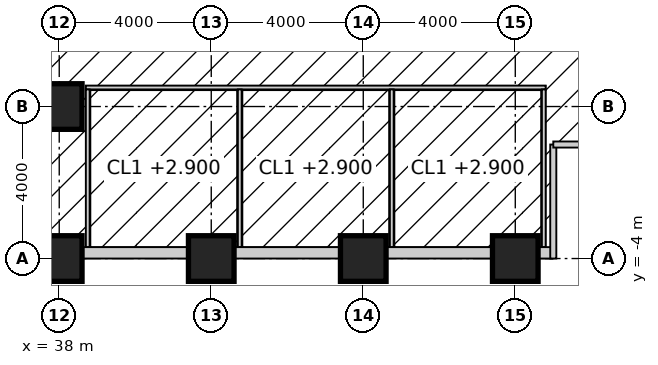
"""IFC4 building model, lengths in metres.
Left out: names, types, materials, properties, quantities, classifications, styles, units other than length and angle.
Written with IfcOpenShell. Run it as: python <this file> out.ifc"""

import sys

from ifc_helpers import new_model, si_unit, direction, frame, frame_2d, origin, origin_2d, place, context, subcontext, project, spatial, rectangle, hollow_rectangle, extrude, element, fill, save


model = new_model("IFC4")
c1 = context("Model", 3, precision=1e-05, world=origin(), true_north=direction((0.0, 1.0)))
c2 = subcontext(c1, "Body", "Model", "MODEL_VIEW")
j1 = project(units=[si_unit("LENGTHUNIT", "METRE"), si_unit("PLANEANGLEUNIT", "RADIAN")], contexts=[c1])
p1 = place(None, origin())
s1 = spatial("IfcSite", under=j1, at=p1, CompositionType="ELEMENT")
p2 = place(p1, origin())
s2 = spatial("IfcBuilding", under=s1, at=p2, CompositionType="ELEMENT")
p3 = place(p2, frame((0.0, 0.0, 27.0)))
s3 = spatial("IfcBuildingStorey", under=s2, at=p3, CompositionType="ELEMENT", Elevation=27.0)
for number, where, z_axis, x_axis in (
    (1, (38.0, -4.0, 0.0), (0.0, 0.0, 1.0), (1.0, 0.0, 0.0)),
    (2, (42.0, -4.0, 0.0), (0.0, 0.0, 1.0), (1.0, 0.0, 0.0)),
    (3, (46.0, -4.0, 0.0), (0.0, 0.0, 1.0), (1.0, 0.0, 0.0)),
    (4, (50.0, -4.0, 0.0), (0.0, 0.0, 1.0), (1.0, 0.0, 0.0)),
    (5, (38.0, 0.0, 0.0), (0.0, 0.0, 1.0), (1.0, 0.0, 0.0)),
):
    element("IfcColumn", number, at=place(p3, frame(where, z_axis=z_axis, x_axis=x_axis)), inside=s3, PredefinedType="COLUMN", context=c2, shape_type="SweptSolid", body=[
        extrude(hollow_rectangle(XDim=1.2, YDim=1.2, WallThickness=0.1, at=origin_2d()), origin(), (0.0, 0.0, 1.0), 4.0),
    ])
p4 = place(p3, frame((38.7, 0.5, 0.0), z_axis=(0.0, 0.0, 1.0), x_axis=(1.0, 0.0, 0.0)))
e6 = element("IfcWall", 6, at=p4, inside=s3, PredefinedType="PARTITIONING", context=c2, shape_type="SweptSolid", body=[
    extrude(rectangle(XDim=12.1, YDim=0.1, at=frame_2d((6.05, 0.0))), origin(), (0.0, 0.0, 1.0), 3.85),
])
p5 = place(p4, frame((1.55, 0.0, 0.0)))
e7 = element("IfcOpeningElement", 7, at=p5, cuts=e6, PredefinedType="OPENING", context=c2, shape_type="SweptSolid", body=[
    extrude(rectangle(XDim=1.0, YDim=2.2, at=frame_2d((0.5, 1.1))), frame((0.0, 0.06, 0.0), z_axis=(0.0, -1.0, 0.0), x_axis=(1.0, 0.0, 0.0)), (0.0, 0.0, 1.0), 0.12),
])
p6 = place(p4, frame((5.55, 0.0, 0.0)))
e8 = element("IfcOpeningElement", 8, at=p6, cuts=e6, PredefinedType="OPENING", context=c2, shape_type="SweptSolid", body=[
    extrude(rectangle(XDim=1.0, YDim=2.2, at=frame_2d((0.5, 1.1))), frame((0.0, 0.06, 0.0), z_axis=(0.0, -1.0, 0.0), x_axis=(1.0, 0.0, 0.0)), (0.0, 0.0, 1.0), 0.12),
])
p7 = place(p4, frame((9.55, 0.0, 0.0)))
e9 = element("IfcOpeningElement", 9, at=p7, cuts=e6, PredefinedType="OPENING", context=c2, shape_type="SweptSolid", body=[
    extrude(rectangle(XDim=1.0, YDim=2.2, at=frame_2d((0.5, 1.1))), frame((0.0, 0.06, 0.0), z_axis=(0.0, -1.0, 0.0), x_axis=(1.0, 0.0, 0.0)), (0.0, 0.0, 1.0), 0.12),
])
for number, where, z_axis, x_axis in (
    (10, (38.75, -3.7, 0.0), (0.0, 0.0, 1.0), (0.0, 1.0, 0.0)),
    (11, (42.75, -3.7, 0.0), (0.0, 0.0, 1.0), (0.0, 1.0, 0.0)),
    (12, (46.75, -3.7, 0.0), (0.0, 0.0, 1.0), (0.0, 1.0, 0.0)),
    (13, (50.75, -3.7, 0.0), (0.0, 0.0, 1.0), (0.0, 1.0, 0.0)),
):
    element("IfcWall", number, at=place(p3, frame(where, z_axis=z_axis, x_axis=x_axis)), inside=s3, PredefinedType="PARTITIONING", context=c2, shape_type="SweptSolid", body=[
        extrude(rectangle(XDim=4.15, YDim=0.1, at=frame_2d((2.075, 0.0))), origin(), (0.0, 0.0, 1.0), 3.85),
    ])
p8 = place(p3, frame((38.6, -3.85, 0.0), z_axis=(0.0, 0.0, 1.0), x_axis=(1.0, 0.0, 0.0)))
e14 = element("IfcWall", 14, at=p8, inside=s3, PredefinedType="ELEMENTEDWALL", context=c2, shape_type="SweptSolid", body=[
    extrude(rectangle(XDim=2.8, YDim=0.3, at=frame_2d((1.4, 0.0))), origin(), (0.0, 0.0, 1.0), 2.85),
])
p9 = place(p8, frame((0.4, 0.0, 0.8)))
e15 = element("IfcOpeningElement", 15, at=p9, cuts=e14, PredefinedType="OPENING", context=c2, shape_type="SweptSolid", body=[
    extrude(rectangle(XDim=2.0, YDim=2.0, at=frame_2d((1.0, 1.0))), frame((0.0, 0.16, 0.0), z_axis=(0.0, -1.0, 0.0), x_axis=(1.0, 0.0, 0.0)), (0.0, 0.0, 1.0), 0.32),
])
p10 = place(p3, frame((42.6, -3.85, 0.0), z_axis=(0.0, 0.0, 1.0), x_axis=(1.0, 0.0, 0.0)))
e16 = element("IfcWall", 16, at=p10, inside=s3, PredefinedType="ELEMENTEDWALL", context=c2, shape_type="SweptSolid", body=[
    extrude(rectangle(XDim=2.8, YDim=0.3, at=frame_2d((1.4, 0.0))), origin(), (0.0, 0.0, 1.0), 2.85),
])
p11 = place(p10, frame((0.4, 0.0, 0.8)))
e17 = element("IfcOpeningElement", 17, at=p11, cuts=e16, PredefinedType="OPENING", context=c2, shape_type="SweptSolid", body=[
    extrude(rectangle(XDim=2.0, YDim=2.0, at=frame_2d((1.0, 1.0))), frame((0.0, 0.16, 0.0), z_axis=(0.0, -1.0, 0.0), x_axis=(1.0, 0.0, 0.0)), (0.0, 0.0, 1.0), 0.32),
])
p12 = place(p3, frame((46.6, -3.85, 0.0), z_axis=(0.0, 0.0, 1.0), x_axis=(1.0, 0.0, 0.0)))
e18 = element("IfcWall", 18, at=p12, inside=s3, PredefinedType="ELEMENTEDWALL", context=c2, shape_type="SweptSolid", body=[
    extrude(rectangle(XDim=2.8, YDim=0.3, at=frame_2d((1.4, 0.0))), origin(), (0.0, 0.0, 1.0), 2.85),
])
p13 = place(p12, frame((0.4, 0.0, 0.8)))
e19 = element("IfcOpeningElement", 19, at=p13, cuts=e18, PredefinedType="OPENING", context=c2, shape_type="SweptSolid", body=[
    extrude(rectangle(XDim=2.0, YDim=2.0, at=frame_2d((1.0, 1.0))), frame((0.0, 0.16, 0.0), z_axis=(0.0, -1.0, 0.0), x_axis=(1.0, 0.0, 0.0)), (0.0, 0.0, 1.0), 0.32),
])
p14 = place(p3, frame((50.6, -3.85, 0.0), z_axis=(0.0, 0.0, 1.0), x_axis=(1.0, 0.0, 0.0)))
e20 = element("IfcWall", 20, at=p14, inside=s3, PredefinedType="ELEMENTEDWALL", context=c2, shape_type="SweptSolid", body=[
    extrude(rectangle(XDim=0.37, YDim=0.3, at=frame_2d((0.185, 0.0))), origin(), (0.0, 0.0, 1.0), 2.95),
])
p15 = place(p5, origin())
e21 = element("IfcDoor", 21, at=p15, inside=s3, OperationType="SINGLE_SWING_LEFT", PredefinedType="DOOR", context=c2, shape_type="SweptSolid", body=[
    extrude(rectangle(XDim=1.0, YDim=2.2, at=frame_2d((0.5, 1.1))), frame((0.0, 0.025, 0.0), z_axis=(0.0, -1.0, 0.0), x_axis=(1.0, 0.0, 0.0)), (0.0, 0.0, 1.0), 0.05),
])
fill(e7, e21)
p16 = place(p6, origin())
e22 = element("IfcDoor", 22, at=p16, inside=s3, OperationType="SINGLE_SWING_LEFT", PredefinedType="DOOR", context=c2, shape_type="SweptSolid", body=[
    extrude(rectangle(XDim=1.0, YDim=2.2, at=frame_2d((0.5, 1.1))), frame((0.0, 0.025, 0.0), z_axis=(0.0, -1.0, 0.0), x_axis=(1.0, 0.0, 0.0)), (0.0, 0.0, 1.0), 0.05),
])
fill(e8, e22)
p17 = place(p7, origin())
e23 = element("IfcDoor", 23, at=p17, inside=s3, OperationType="SINGLE_SWING_LEFT", PredefinedType="DOOR", context=c2, shape_type="SweptSolid", body=[
    extrude(rectangle(XDim=1.0, YDim=2.2, at=frame_2d((0.5, 1.1))), frame((0.0, 0.025, 0.0), z_axis=(0.0, -1.0, 0.0), x_axis=(1.0, 0.0, 0.0)), (0.0, 0.0, 1.0), 0.05),
])
fill(e9, e23)
p18 = place(p9, origin())
e24 = element("IfcWindow", 24, at=p18, inside=s3, PartitioningType="SINGLE_PANEL", PredefinedType="WINDOW", context=c2, shape_type="SweptSolid", body=[
    extrude(rectangle(XDim=2.0, YDim=2.0, at=frame_2d((1.0, 1.0))), frame((0.0, 0.03, 0.0), z_axis=(0.0, -1.0, 0.0), x_axis=(1.0, 0.0, 0.0)), (0.0, 0.0, 1.0), 0.06),
])
fill(e15, e24)
p19 = place(p11, origin())
e25 = element("IfcWindow", 25, at=p19, inside=s3, PartitioningType="SINGLE_PANEL", PredefinedType="WINDOW", context=c2, shape_type="SweptSolid", body=[
    extrude(rectangle(XDim=2.0, YDim=2.0, at=frame_2d((1.0, 1.0))), frame((0.0, 0.03, 0.0), z_axis=(0.0, -1.0, 0.0), x_axis=(1.0, 0.0, 0.0)), (0.0, 0.0, 1.0), 0.06),
])
fill(e17, e25)
p20 = place(p13, origin())
e26 = element("IfcWindow", 26, at=p20, inside=s3, PartitioningType="SINGLE_PANEL", PredefinedType="WINDOW", context=c2, shape_type="SweptSolid", body=[
    extrude(rectangle(XDim=2.0, YDim=2.0, at=frame_2d((1.0, 1.0))), frame((0.0, 0.03, 0.0), z_axis=(0.0, -1.0, 0.0), x_axis=(1.0, 0.0, 0.0)), (0.0, 0.0, 1.0), 0.06),
])
fill(e19, e26)
save(model, sys.argv[1])
